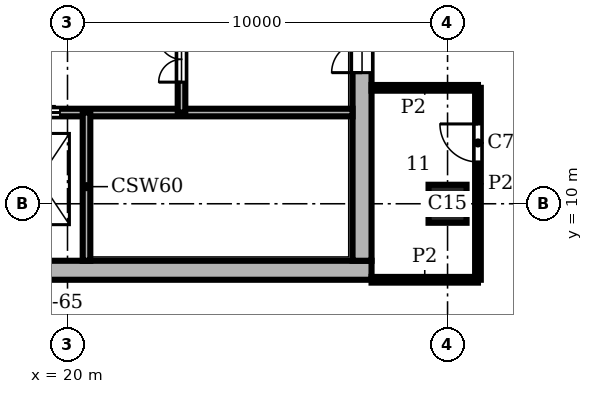
"""IFC4 building model, lengths in metres.
Left out: names, types, materials, properties, quantities, classifications, styles, units other than length and angle.
Written with IfcOpenShell. Run it as: python <this file> out.ifc"""

import sys

from ifc_helpers import new_model, si_unit, direction, frame, frame_2d, origin, origin_2d, place, context, subcontext, project, spatial, rectangle, extrude, element, fill, save


model = new_model("IFC4")
c1 = context("Model", 3, precision=1e-05, world=origin(), true_north=direction((0.0, 1.0)))
c2 = subcontext(c1, "Body", "Model", "MODEL_VIEW")
j1 = project(units=[si_unit("LENGTHUNIT", "METRE"), si_unit("PLANEANGLEUNIT", "RADIAN")], contexts=[c1])
p1 = place(None, origin())
s1 = spatial("IfcSite", under=j1, at=p1, CompositionType="ELEMENT")
p2 = place(p1, origin())
s2 = spatial("IfcBuilding", under=s1, at=p2, CompositionType="ELEMENT")
p3 = place(p2, frame((0.0, 0.0, 313.8)))
s3 = spatial("IfcBuildingStorey", under=s2, at=p3, CompositionType="ELEMENT", Elevation=313.8)
p4 = place(p3, frame((30.0, 10.0, 0.0), z_axis=(0.0, 0.0, 1.0), x_axis=(1.0, 0.0, 0.0)))
e1 = element("IfcColumn", 1, at=p4, inside=s3, PredefinedType="COLUMN", context=c2, shape_type="SweptSolid", body=[
    extrude(rectangle(XDim=1.0, YDim=1.0, at=origin_2d()), origin(), (0.0, 0.0, 1.0), 3.9),
])
p5 = place(p3, frame((8.0, 8.25, 0.0), z_axis=(0.0, 0.0, 1.0), x_axis=(1.0, 0.0, 0.0)))
e2 = element("IfcWall", 2, at=p5, inside=s3, PredefinedType="SHEAR", context=c2, shape_type="SweptSolid", body=[
    extrude(rectangle(XDim=20.0, YDim=0.5, at=frame_2d((10.0, 0.0))), origin(), (0.0, 0.0, 1.0), 3.9),
])
p6 = place(p3, frame((27.75, 8.5, 0.0), z_axis=(0.0, 0.0, 1.0), x_axis=(0.0, 1.0, 0.0)))
e3 = element("IfcWall", 3, at=p6, inside=s3, PredefinedType="SHEAR", context=c2, shape_type="SweptSolid", body=[
    extrude(rectangle(XDim=19.0, YDim=0.5, at=frame_2d((9.5, 0.0))), origin(), (0.0, 0.0, 1.0), 3.9),
])
p7 = place(p6, frame((4.95, 0.0, 0.0)))
e4 = element("IfcOpeningElement", 4, at=p7, cuts=e3, PredefinedType="OPENING", context=c2, shape_type="SweptSolid", body=[
    extrude(rectangle(XDim=1.6, YDim=2.1, at=frame_2d((0.8, 1.05))), frame((0.0, 0.26, 0.0), z_axis=(0.0, -1.0, 0.0), x_axis=(1.0, 0.0, 0.0)), (0.0, 0.0, 1.0), 0.52),
])
p8 = place(p3, frame((13.8, 12.4, 0.0), z_axis=(0.0, 0.0, 1.0), x_axis=(1.0, 0.0, 0.0)))
e5 = element("IfcWall", 5, at=p8, inside=s3, PredefinedType="SHEAR", context=c2, shape_type="SweptSolid", body=[
    extrude(rectangle(XDim=13.7, YDim=0.2, at=frame_2d((6.85, 0.0))), origin(), (0.0, 0.0, 1.0), 3.58),
])
p9 = place(p8, frame((2.4, 0.0, 0.0)))
e6 = element("IfcOpeningElement", 6, at=p9, cuts=e5, PredefinedType="OPENING", context=c2, shape_type="SweptSolid", body=[
    extrude(rectangle(XDim=1.1, YDim=2.1, at=frame_2d((0.55, 1.05))), frame((0.0, 0.11, 0.0), z_axis=(0.0, -1.0, 0.0), x_axis=(1.0, 0.0, 0.0)), (0.0, 0.0, 1.0), 0.22),
])
p10 = place(p8, frame((4.9, 0.0, 0.0)))
e7 = element("IfcOpeningElement", 7, at=p10, cuts=e5, PredefinedType="OPENING", context=c2, shape_type="SweptSolid", body=[
    extrude(rectangle(XDim=1.1, YDim=2.1, at=frame_2d((0.55, 1.05))), frame((0.0, 0.11, 0.0), z_axis=(0.0, -1.0, 0.0), x_axis=(1.0, 0.0, 0.0)), (0.0, 0.0, 1.0), 0.22),
])
p11 = place(p8, frame((0.15, 0.0, 0.0)))
e8 = element("IfcOpeningElement", 8, at=p11, cuts=e5, PredefinedType="OPENING", context=c2, shape_type="SweptSolid", body=[
    extrude(rectangle(XDim=1.0, YDim=2.1, at=frame_2d((0.5, 1.05))), frame((0.0, 0.11, 0.0), z_axis=(0.0, -1.0, 0.0), x_axis=(1.0, 0.0, 0.0)), (0.0, 0.0, 1.0), 0.22),
])
p12 = place(p3, frame((20.5, 8.5, 0.0), z_axis=(0.0, 0.0, 1.0), x_axis=(0.0, 1.0, 0.0)))
e9 = element("IfcWall", 9, at=p12, inside=s3, PredefinedType="SHEAR", context=c2, shape_type="SweptSolid", body=[
    extrude(rectangle(XDim=3.9, YDim=0.2, at=frame_2d((1.95, 0.0))), origin(), (0.0, 0.0, 1.0), 3.58),
])
p13 = place(p3, frame((23.0, 12.4, 0.0), z_axis=(0.0, 0.0, 1.0), x_axis=(0.0, 1.0, 0.0)))
e10 = element("IfcWall", 10, at=p13, inside=s3, PredefinedType="SHEAR", context=c2, shape_type="SweptSolid", body=[
    extrude(rectangle(XDim=2.8, YDim=0.2, at=frame_2d((1.4, 0.0))), origin(), (0.0, 0.0, 1.0), 3.58),
])
p14 = place(p13, frame((0.8, 0.0, 0.0)))
e11 = element("IfcOpeningElement", 11, at=p14, cuts=e10, PredefinedType="OPENING", context=c2, shape_type="SweptSolid", body=[
    extrude(rectangle(XDim=1.2, YDim=2.1, at=frame_2d((0.6, 1.05))), frame((0.0, 0.11, 0.0), z_axis=(0.0, -1.0, 0.0), x_axis=(1.0, 0.0, 0.0)), (0.0, 0.0, 1.0), 0.22),
])
p15 = place(p3, frame((30.8, 8.0, 0.0), z_axis=(0.0, 0.0, 1.0), x_axis=(0.0, 1.0, 0.0)))
e12 = element("IfcWall", 12, at=p15, inside=s3, PredefinedType="PARTITIONING", context=c2, shape_type="SweptSolid", body=[
    extrude(rectangle(XDim=5.05, YDim=0.15, at=frame_2d((2.525, 0.0))), origin(), (0.0, 0.0, 1.0), 3.58),
])
p16 = place(p15, frame((3.1, 0.0, 0.0)))
e13 = element("IfcOpeningElement", 13, at=p16, cuts=e12, PredefinedType="OPENING", context=c2, shape_type="SweptSolid", body=[
    extrude(rectangle(XDim=1.0, YDim=2.1, at=frame_2d((0.5, 1.05))), frame((0.0, 0.085, 0.0), z_axis=(0.0, -1.0, 0.0), x_axis=(1.0, 0.0, 0.0)), (0.0, 0.0, 1.0), 0.17),
])
for number, where, z_axis, x_axis in (
    (14, (28.0, 8.0, 0.0), (0.0, 0.0, 1.0), (1.0, 0.0, 0.0)),
    (15, (28.0, 13.05, 0.0), (0.0, 0.0, 1.0), (1.0, 0.0, 0.0)),
):
    element("IfcWall", number, at=place(p3, frame(where, z_axis=z_axis, x_axis=x_axis)), inside=s3, PredefinedType="PARTITIONING", context=c2, shape_type="SweptSolid", body=[
        extrude(rectangle(XDim=2.8, YDim=0.15, at=frame_2d((1.4, 0.0))), origin(), (0.0, 0.0, 1.0), 3.58),
    ])
p17 = place(p10, origin())
e16 = element("IfcDoor", 16, at=p17, inside=s3, OperationType="DOUBLE_DOOR_SLIDING", PredefinedType="DOOR", context=c2, shape_type="SweptSolid", body=[
    extrude(rectangle(XDim=1.1, YDim=2.1, at=frame_2d((0.55, 1.05))), frame((0.0, 0.025, 0.0), z_axis=(0.0, -1.0, 0.0), x_axis=(1.0, 0.0, 0.0)), (0.0, 0.0, 1.0), 0.05),
])
fill(e7, e16)
p18 = place(p14, origin())
e17 = element("IfcDoor", 17, at=p18, inside=s3, OperationType="DOUBLE_DOOR_SINGLE_SWING", PredefinedType="DOOR", context=c2, shape_type="SweptSolid", body=[
    extrude(rectangle(XDim=1.2, YDim=2.1, at=frame_2d((0.6, 1.05))), frame((0.0, 0.025, 0.0), z_axis=(0.0, -1.0, 0.0), x_axis=(1.0, 0.0, 0.0)), (0.0, 0.0, 1.0), 0.05),
])
fill(e11, e17)
p19 = place(p7, origin())
e18 = element("IfcDoor", 18, at=p19, inside=s3, OperationType="DOUBLE_DOOR_SINGLE_SWING", PredefinedType="DOOR", context=c2, shape_type="SweptSolid", body=[
    extrude(rectangle(XDim=1.6, YDim=2.1, at=frame_2d((0.8, 1.05))), frame((0.0, 0.025, 0.0), z_axis=(0.0, -1.0, 0.0), x_axis=(1.0, 0.0, 0.0)), (0.0, 0.0, 1.0), 0.05),
])
fill(e4, e18)
p20 = place(p16, origin())
e19 = element("IfcDoor", 19, at=p20, inside=s3, OperationType="SINGLE_SWING_RIGHT", PredefinedType="DOOR", context=c2, shape_type="SweptSolid", body=[
    extrude(rectangle(XDim=1.0, YDim=2.1, at=frame_2d((0.5, 1.05))), frame((0.0, 0.025, 0.0), z_axis=(0.0, -1.0, 0.0), x_axis=(1.0, 0.0, 0.0)), (0.0, 0.0, 1.0), 0.05),
])
fill(e13, e19)
save(model, sys.argv[1])
